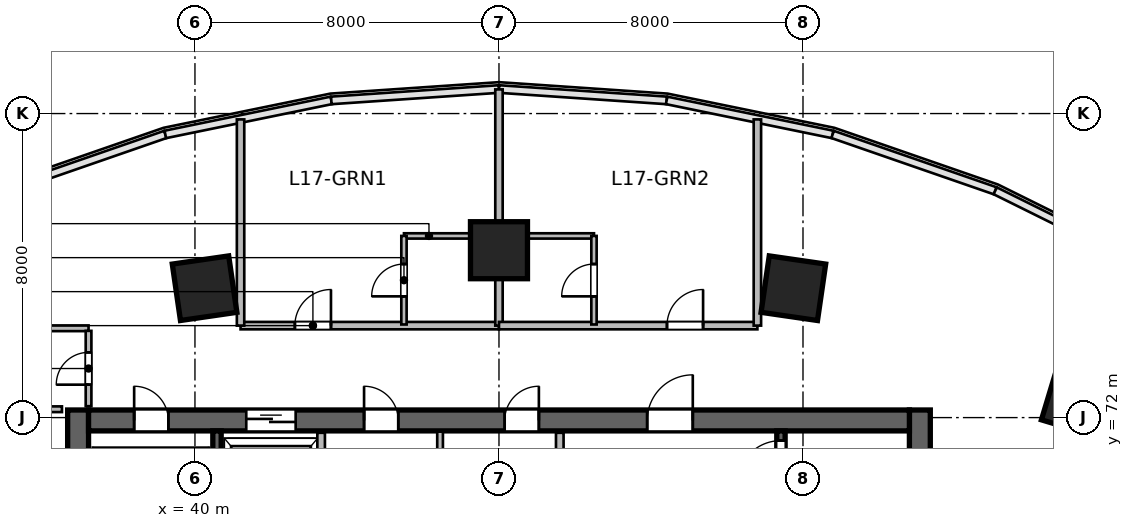
"""IFC4 building model, lengths in metres.
Left out: names, types, materials, properties, quantities, classifications, styles, units other than length and angle.
Written with IfcOpenShell. Run it as: python <this file> out.ifc"""

import sys

from ifc_helpers import new_model, si_unit, direction, frame, frame_2d, origin, origin_2d, place, context, subcontext, project, spatial, rectangle, extrude, source, transform, mapped, element, fill, save


model = new_model("IFC4")
c1 = context("Model", 3, precision=1e-05, world=origin(), true_north=direction((0.0, 1.0)))
c2 = subcontext(c1, "Body", "Model", "MODEL_VIEW")
j1 = project(units=[si_unit("LENGTHUNIT", "METRE"), si_unit("PLANEANGLEUNIT", "RADIAN")], contexts=[c1])
p1 = place(None, origin())
s1 = spatial("IfcSite", under=j1, at=p1, CompositionType="ELEMENT")
p2 = place(p1, origin())
s2 = spatial("IfcBuilding", under=s1, at=p2, CompositionType="ELEMENT")
p3 = place(p2, frame((0.0, 0.0, 75.0)))
s3 = spatial("IfcBuildingStorey", under=s2, at=p3, CompositionType="ELEMENT", Elevation=75.0)
m1 = source(origin(), c2, "Body", "SweptSolid", [
    extrude(rectangle(XDim=12.0, YDim=0.55, at=frame_2d((6.0, 0.0))), origin(), (0.0, 0.0, 1.0), 3.6),
])
for number, where, z_axis, x_axis in (
    (1, (36.925, 60.2, 0.0), (0.0, 0.0, 1.0), (0.0, 1.0, 0.0)),
    (2, (59.075, 60.2, 0.0), (0.0, 0.0, 1.0), (0.0, 1.0, 0.0)),
):
    element("IfcWall", number, at=place(p3, frame(where, z_axis=z_axis, x_axis=x_axis)), inside=s3, PredefinedType="SHEAR", context=c2, shape_type="MappedRepresentation", body=[
        mapped(m1, transform((0.0, 0.0, 0.0), scale=1.0)),
    ])
m2 = source(origin(), c2, "Body", "SweptSolid", [
    extrude(rectangle(XDim=21.6, YDim=0.55, at=frame_2d((10.8, 0.0))), origin(), (0.0, 0.0, 1.0), 3.6),
])
p4 = place(p3, frame((37.2, 71.925, 0.0), z_axis=(0.0, 0.0, 1.0), x_axis=(1.0, 0.0, 0.0)))
e3 = element("IfcWall", 3, at=p4, inside=s3, PredefinedType="SHEAR", context=c2, shape_type="MappedRepresentation", body=[
    mapped(m2, transform((0.0, 0.0, 0.0), scale=1.0)),
])
p5 = place(p4, frame((1.2, 0.0, 0.0)))
e4 = element("IfcOpeningElement", 4, at=p5, cuts=e3, PredefinedType="OPENING", context=c2, shape_type="SweptSolid", body=[
    extrude(rectangle(XDim=0.9, YDim=2.1, at=frame_2d((0.45, 1.05))), frame((0.0, 0.285, 0.0), z_axis=(0.0, -1.0, 0.0), x_axis=(1.0, 0.0, 0.0)), (0.0, 0.0, 1.0), 0.57),
])
p6 = place(p4, frame((14.7, 0.0, 0.0)))
e5 = element("IfcOpeningElement", 5, at=p6, cuts=e3, PredefinedType="OPENING", context=c2, shape_type="SweptSolid", body=[
    extrude(rectangle(XDim=1.2, YDim=2.15, at=frame_2d((0.6, 1.075))), frame((0.0, 0.285, 0.0), z_axis=(0.0, -1.0, 0.0), x_axis=(1.0, 0.0, 0.0)), (0.0, 0.0, 1.0), 0.57),
])
p7 = place(p4, frame((4.15, 0.0, 0.0)))
e6 = element("IfcOpeningElement", 6, at=p7, cuts=e3, PredefinedType="OPENING", context=c2, shape_type="SweptSolid", body=[
    extrude(rectangle(XDim=1.3, YDim=2.15, at=frame_2d((0.65, 1.075))), frame((0.0, 0.285, 0.0), z_axis=(0.0, -1.0, 0.0), x_axis=(1.0, 0.0, 0.0)), (0.0, 0.0, 1.0), 0.57),
])
p8 = place(p4, frame((7.25, 0.0, 0.0)))
e7 = element("IfcOpeningElement", 7, at=p8, cuts=e3, PredefinedType="OPENING", context=c2, shape_type="SweptSolid", body=[
    extrude(rectangle(XDim=0.9, YDim=2.1, at=frame_2d((0.45, 1.05))), frame((0.0, 0.285, 0.0), z_axis=(0.0, -1.0, 0.0), x_axis=(1.0, 0.0, 0.0)), (0.0, 0.0, 1.0), 0.57),
])
p9 = place(p4, frame((10.95, 0.0, 0.0)))
e8 = element("IfcOpeningElement", 8, at=p9, cuts=e3, PredefinedType="OPENING", context=c2, shape_type="SweptSolid", body=[
    extrude(rectangle(XDim=0.9, YDim=2.1, at=frame_2d((0.45, 1.05))), frame((0.0, 0.285, 0.0), z_axis=(0.0, -1.0, 0.0), x_axis=(1.0, 0.0, 0.0)), (0.0, 0.0, 1.0), 0.57),
])
m3 = source(origin(), c2, "Body", "SweptSolid", [
    extrude(rectangle(XDim=10.9, YDim=0.22, at=frame_2d((5.45, 0.0))), origin(), (0.0, 0.0, 1.0), 3.6),
])
p10 = place(p3, frame((40.58, 60.75, 0.0), z_axis=(0.0, 0.0, 1.0), x_axis=(0.0, 1.0, 0.0)))
e9 = element("IfcWall", 9, at=p10, inside=s3, PredefinedType="SHEAR", context=c2, shape_type="MappedRepresentation", body=[
    mapped(m3, transform((0.0, 0.0, 0.0), scale=1.0)),
])
p11 = place(p3, frame((55.42, 60.75, 0.0), z_axis=(0.0, 0.0, 1.0), x_axis=(0.0, 1.0, 0.0)))
e10 = element("IfcWall", 10, at=p11, inside=s3, PredefinedType="SHEAR", context=c2, shape_type="MappedRepresentation", body=[
    mapped(m3, transform((0.0, 0.0, 0.0), scale=1.0)),
])
p12 = place(p11, frame((9.495, 0.0, 0.0)))
e11 = element("IfcOpeningElement", 11, at=p12, cuts=e10, PredefinedType="OPENING", context=c2, shape_type="SweptSolid", body=[
    extrude(rectangle(XDim=1.15, YDim=2.15, at=frame_2d((0.575, 1.075))), frame((0.0, 0.12, 0.0), z_axis=(0.0, -1.0, 0.0), x_axis=(1.0, 0.0, 0.0)), (0.0, 0.0, 1.0), 0.24),
])
m4 = source(origin(), c2, "Body", "SweptSolid", [
    extrude(rectangle(XDim=1.5, YDim=1.5, at=origin_2d()), origin(), (0.0, 0.0, 1.0), 3.6),
])
for number, where, z_axis, x_axis in (
    (12, (40.253, 75.404, 0.0), (0.0, 0.0, 1.0), (-0.143, 0.99, 0.0)),
    (13, (48.0, 76.404, 0.0), (0.0, 0.0, 1.0), (0.0, 1.0, 0.0)),
    (14, (55.747, 75.404, 0.0), (0.0, 0.0, 1.0), (0.143, 0.99, 0.0)),
    (15, (63.209, 72.442, 0.0), (0.0, 0.0, 1.0), (0.289, 0.957, 0.0)),
):
    element("IfcColumn", number, at=place(p3, frame(where, z_axis=z_axis, x_axis=x_axis)), inside=s3, PredefinedType="COLUMN", context=c2, shape_type="MappedRepresentation", body=[
        mapped(m4, transform((0.0, 0.0, 0.0), scale=1.0)),
    ])
m5 = source(origin(), c2, "Body", "SweptSolid", [
    extrude(rectangle(XDim=5.8, YDim=0.2, at=frame_2d((2.9, 0.0))), origin(), (0.0, 0.0, 1.0), 3.36),
])
p13 = place(p3, frame((49.6, 65.8, 0.0), z_axis=(0.0, 0.0, 1.0), x_axis=(0.0, 1.0, 0.0)))
e16 = element("IfcWall", 16, at=p13, inside=s3, PredefinedType="SOLIDWALL", context=c2, shape_type="MappedRepresentation", body=[
    mapped(m5, transform((0.0, 0.0, 0.0), scale=1.0)),
])
m6 = source(origin(), c2, "Body", "SweptSolid", [
    extrude(rectangle(XDim=3.2, YDim=0.2, at=frame_2d((1.6, 0.0))), origin(), (0.0, 0.0, 1.0), 3.36),
])
p14 = place(p3, frame((43.32, 68.4, 0.0), z_axis=(0.0, 0.0, 1.0), x_axis=(0.0, 1.0, 0.0)))
e17 = element("IfcWall", 17, at=p14, inside=s3, PredefinedType="SOLIDWALL", context=c2, shape_type="MappedRepresentation", body=[
    mapped(m6, transform((0.0, 0.0, 0.0), scale=1.0)),
])
m7 = source(origin(), c2, "Body", "SweptSolid", [
    extrude(rectangle(XDim=3.23, YDim=0.15, at=frame_2d((1.615, 0.0))), origin(), (0.0, 0.0, 1.0), 3.36),
])
p15 = place(p3, frame((46.45, 68.4, 0.0), z_axis=(0.0, 0.0, 1.0), x_axis=(0.0, 1.0, 0.0)))
e18 = element("IfcWall", 18, at=p15, inside=s3, PredefinedType="PARTITIONING", context=c2, shape_type="MappedRepresentation", body=[
    mapped(m7, transform((0.0, 0.0, 0.0), scale=1.0)),
])
m8 = source(origin(), c2, "Body", "SweptSolid", [
    extrude(rectangle(XDim=2.1, YDim=0.15, at=frame_2d((1.05, 0.0))), origin(), (0.0, 0.0, 1.0), 3.36),
])
p16 = place(p3, frame((34.4, 72.22, 0.0), z_axis=(0.0, 0.0, 1.0), x_axis=(1.0, 0.0, 0.0)))
e19 = element("IfcWall", 19, at=p16, inside=s3, PredefinedType="PARTITIONING", context=c2, shape_type="MappedRepresentation", body=[
    mapped(m8, transform((0.0, 0.0, 0.0), scale=1.0)),
])
m9 = source(origin(), c2, "Body", "SweptSolid", [
    extrude(rectangle(XDim=2.8, YDim=0.15, at=frame_2d((1.4, 0.0))), origin(), (0.0, 0.0, 1.0), 3.36),
])
p17 = place(p3, frame((34.4, 74.35, 0.0), z_axis=(0.0, 0.0, 1.0), x_axis=(1.0, 0.0, 0.0)))
e20 = element("IfcWall", 20, at=p17, inside=s3, PredefinedType="PARTITIONING", context=c2, shape_type="MappedRepresentation", body=[
    mapped(m9, transform((0.0, 0.0, 0.0), scale=1.0)),
])
m10 = source(origin(), c2, "Body", "SweptSolid", [
    extrude(rectangle(XDim=1.982, YDim=0.15, at=frame_2d((0.991, 0.0))), origin(), (0.0, 0.0, 1.0), 3.36),
])
p18 = place(p3, frame((37.2, 72.3, 0.0), z_axis=(0.0, 0.0, 1.0), x_axis=(0.0, 1.0, 0.0)))
e21 = element("IfcWall", 21, at=p18, inside=s3, PredefinedType="PARTITIONING", context=c2, shape_type="MappedRepresentation", body=[
    mapped(m10, transform((0.0, 0.0, 0.0), scale=1.0)),
])
p19 = place(p18, frame((0.566, 0.0, 0.0)))
e22 = element("IfcOpeningElement", 22, at=p19, cuts=e21, PredefinedType="OPENING", context=c2, shape_type="SweptSolid", body=[
    extrude(rectangle(XDim=0.85, YDim=2.1, at=frame_2d((0.425, 1.05))), frame((0.0, 0.085, 0.0), z_axis=(0.0, -1.0, 0.0), x_axis=(1.0, 0.0, 0.0)), (0.0, 0.0, 1.0), 0.17),
])
m11 = source(origin(), c2, "Body", "SweptSolid", [
    extrude(rectangle(XDim=6.8, YDim=0.195, at=frame_2d((3.4, 0.0))), origin(), (0.0, 0.0, 1.0), 3.36),
])
p20 = place(p3, frame((41.2, 74.42, 0.0), z_axis=(0.0, 0.0, 1.0), x_axis=(1.0, 0.0, 0.0)))
e23 = element("IfcWall", 23, at=p20, inside=s3, PredefinedType="PARTITIONING", context=c2, shape_type="MappedRepresentation", body=[
    mapped(m11, transform((0.0, 0.0, 0.0), scale=1.0)),
])
p21 = place(p20, frame((1.429, 0.0, 0.0)))
e24 = element("IfcOpeningElement", 24, at=p21, cuts=e23, PredefinedType="OPENING", context=c2, shape_type="SweptSolid", body=[
    extrude(rectangle(XDim=0.95, YDim=2.15, at=frame_2d((0.475, 1.075))), frame((0.0, 0.107, 0.0), z_axis=(0.0, -1.0, 0.0), x_axis=(1.0, 0.0, 0.0)), (0.0, 0.0, 1.0), 0.215),
])
m12 = source(origin(), c2, "Body", "SweptSolid", [
    extrude(rectangle(XDim=6.216, YDim=0.195, at=frame_2d((3.108, 0.0))), origin(), (0.0, 0.0, 1.0), 2.644),
])
p22 = place(p3, frame((48.0, 74.42, 0.0), z_axis=(0.0, 0.0, 1.0), x_axis=(0.0, 1.0, 0.0)))
e25 = element("IfcWall", 25, at=p22, inside=s3, PredefinedType="PARTITIONING", context=c2, shape_type="MappedRepresentation", body=[
    mapped(m12, transform((0.0, 0.0, 0.0), scale=1.0)),
])
m13 = source(origin(), c2, "Body", "SweptSolid", [
    extrude(rectangle(XDim=5.426, YDim=0.195, at=frame_2d((2.713, 0.0))), origin(), (0.0, 0.0, 1.0), 3.36),
])
p23 = place(p3, frame((41.2, 74.42, 0.0), z_axis=(0.0, 0.0, 1.0), x_axis=(0.0, 1.0, 0.0)))
e26 = element("IfcWall", 26, at=p23, inside=s3, PredefinedType="PARTITIONING", context=c2, shape_type="MappedRepresentation", body=[
    mapped(m13, transform((0.0, 0.0, 0.0), scale=1.0)),
])
m14 = source(origin(), c2, "Body", "SweptSolid", [
    extrude(rectangle(XDim=2.35, YDim=0.14, at=frame_2d((1.175, 0.0))), origin(), (0.0, 0.0, 1.0), 3.36),
])
p24 = place(p3, frame((45.5, 76.78, 0.0), z_axis=(0.0, 0.0, 1.0), x_axis=(1.0, 0.0, 0.0)))
e27 = element("IfcWall", 27, at=p24, inside=s3, PredefinedType="PARTITIONING", context=c2, shape_type="MappedRepresentation", body=[
    mapped(m14, transform((0.0, 0.0, 0.0), scale=1.0)),
])
m15 = source(origin(), c2, "Body", "SweptSolid", [
    extrude(rectangle(XDim=2.33, YDim=0.14, at=frame_2d((1.165, 0.0))), origin(), (0.0, 0.0, 1.0), 3.36),
])
p25 = place(p3, frame((45.5, 74.45, 0.0), z_axis=(0.0, 0.0, 1.0), x_axis=(0.0, 1.0, 0.0)))
e28 = element("IfcWall", 28, at=p25, inside=s3, PredefinedType="PARTITIONING", context=c2, shape_type="MappedRepresentation", body=[
    mapped(m15, transform((0.0, 0.0, 0.0), scale=1.0)),
])
p26 = place(p25, frame((0.74, 0.0, 0.0)))
e29 = element("IfcOpeningElement", 29, at=p26, cuts=e28, PredefinedType="OPENING", context=c2, shape_type="SweptSolid", body=[
    extrude(rectangle(XDim=0.85, YDim=2.05, at=frame_2d((0.425, 1.025))), frame((0.0, 0.08, 0.0), z_axis=(0.0, -1.0, 0.0), x_axis=(1.0, 0.0, 0.0)), (0.0, 0.0, 1.0), 0.16),
])
p27 = place(p3, frame((48.0, 74.42, 0.0), z_axis=(0.0, 0.0, 1.0), x_axis=(1.0, 0.0, 0.0)))
e30 = element("IfcWall", 30, at=p27, inside=s3, PredefinedType="PARTITIONING", context=c2, shape_type="MappedRepresentation", body=[
    mapped(m11, transform((0.0, 0.0, 0.0), scale=1.0)),
])
p28 = place(p27, frame((4.421, 0.0, 0.0)))
e31 = element("IfcOpeningElement", 31, at=p28, cuts=e30, PredefinedType="OPENING", context=c2, shape_type="SweptSolid", body=[
    extrude(rectangle(XDim=0.95, YDim=2.15, at=frame_2d((0.475, 1.075))), frame((0.0, 0.107, 0.0), z_axis=(0.0, -1.0, 0.0), x_axis=(1.0, 0.0, 0.0)), (0.0, 0.0, 1.0), 0.215),
])
p29 = place(p3, frame((54.8, 74.42, 0.0), z_axis=(0.0, 0.0, 1.0), x_axis=(0.0, 1.0, 0.0)))
e32 = element("IfcWall", 32, at=p29, inside=s3, PredefinedType="PARTITIONING", context=c2, shape_type="MappedRepresentation", body=[
    mapped(m13, transform((0.0, 0.0, 0.0), scale=1.0)),
])
p30 = place(p3, frame((48.15, 76.78, 0.0), z_axis=(0.0, 0.0, 1.0), x_axis=(1.0, 0.0, 0.0)))
e33 = element("IfcWall", 33, at=p30, inside=s3, PredefinedType="PARTITIONING", context=c2, shape_type="MappedRepresentation", body=[
    mapped(m14, transform((0.0, 0.0, 0.0), scale=1.0)),
])
p31 = place(p3, frame((50.5, 74.45, 0.0), z_axis=(0.0, 0.0, 1.0), x_axis=(0.0, 1.0, 0.0)))
e34 = element("IfcWall", 34, at=p31, inside=s3, PredefinedType="PARTITIONING", context=c2, shape_type="MappedRepresentation", body=[
    mapped(m15, transform((0.0, 0.0, 0.0), scale=1.0)),
])
p32 = place(p31, frame((0.74, 0.0, 0.0)))
e35 = element("IfcOpeningElement", 35, at=p32, cuts=e34, PredefinedType="OPENING", context=c2, shape_type="SweptSolid", body=[
    extrude(rectangle(XDim=0.85, YDim=2.05, at=frame_2d((0.425, 1.025))), frame((0.0, 0.08, 0.0), z_axis=(0.0, -1.0, 0.0), x_axis=(1.0, 0.0, 0.0)), (0.0, 0.0, 1.0), 0.16),
])
m16 = source(origin(), c2, "Body", "SweptSolid", [
    extrude(rectangle(XDim=0.9, YDim=2.1, at=frame_2d((0.45, 1.05))), frame((0.0, 0.025, 0.0), z_axis=(0.0, -1.0, 0.0), x_axis=(1.0, 0.0, 0.0)), (0.0, 0.0, 1.0), 0.05),
])
p33 = place(p5, origin())
e36 = element("IfcDoor", 36, at=p33, inside=s3, OperationType="SINGLE_SWING_LEFT", PredefinedType="DOOR", context=c2, shape_type="MappedRepresentation", body=[
    mapped(m16, transform((0.0, 0.0, 0.0), scale=1.0)),
])
fill(e4, e36)
m17 = source(origin(), c2, "Body", "SweptSolid", [
    extrude(rectangle(XDim=1.15, YDim=2.15, at=frame_2d((0.575, 1.075))), frame((0.0, 0.025, 0.0), z_axis=(0.0, -1.0, 0.0), x_axis=(1.0, 0.0, 0.0)), (0.0, 0.0, 1.0), 0.05),
])
p34 = place(p12, origin())
e37 = element("IfcDoor", 37, at=p34, inside=s3, OperationType="SINGLE_SWING_LEFT", PredefinedType="DOOR", context=c2, shape_type="MappedRepresentation", body=[
    mapped(m17, transform((0.0, 0.0, 0.0), scale=1.0)),
])
fill(e11, e37)
m18 = source(origin(), c2, "Body", "SweptSolid", [
    extrude(rectangle(XDim=1.2, YDim=2.15, at=frame_2d((0.6, 1.075))), frame((0.0, 0.025, 0.0), z_axis=(0.0, -1.0, 0.0), x_axis=(1.0, 0.0, 0.0)), (0.0, 0.0, 1.0), 0.05),
])
p35 = place(p6, origin())
e38 = element("IfcDoor", 38, at=p35, inside=s3, OperationType="SINGLE_SWING_RIGHT", PredefinedType="DOOR", context=c2, shape_type="MappedRepresentation", body=[
    mapped(m18, transform((0.0, 0.0, 0.0), scale=1.0)),
])
fill(e5, e38)
m19 = source(origin(), c2, "Body", "SweptSolid", [
    extrude(rectangle(XDim=1.3, YDim=2.15, at=frame_2d((0.65, 1.075))), frame((0.0, 0.025, 0.0), z_axis=(0.0, -1.0, 0.0), x_axis=(1.0, 0.0, 0.0)), (0.0, 0.0, 1.0), 0.05),
])
p36 = place(p7, origin())
e39 = element("IfcDoor", 39, at=p36, inside=s3, OperationType="DOUBLE_DOOR_SLIDING", PredefinedType="DOOR", context=c2, shape_type="MappedRepresentation", body=[
    mapped(m19, transform((0.0, 0.0, 0.0), scale=1.0)),
])
fill(e6, e39)
p37 = place(p8, origin())
e40 = element("IfcDoor", 40, at=p37, inside=s3, OperationType="SINGLE_SWING_LEFT", PredefinedType="DOOR", context=c2, shape_type="MappedRepresentation", body=[
    mapped(m16, transform((0.0, 0.0, 0.0), scale=1.0)),
])
fill(e7, e40)
p38 = place(p9, origin())
e41 = element("IfcDoor", 41, at=p38, inside=s3, OperationType="SINGLE_SWING_RIGHT", PredefinedType="DOOR", context=c2, shape_type="MappedRepresentation", body=[
    mapped(m16, transform((0.0, 0.0, 0.0), scale=1.0)),
])
fill(e8, e41)
m20 = source(origin(), c2, "Body", "SweptSolid", [
    extrude(rectangle(XDim=0.85, YDim=2.1, at=frame_2d((0.425, 1.05))), frame((0.0, 0.025, 0.0), z_axis=(0.0, -1.0, 0.0), x_axis=(1.0, 0.0, 0.0)), (0.0, 0.0, 1.0), 0.05),
])
p39 = place(p19, origin())
e42 = element("IfcDoor", 42, at=p39, inside=s3, OperationType="SINGLE_SWING_LEFT", PredefinedType="DOOR", context=c2, shape_type="MappedRepresentation", body=[
    mapped(m20, transform((0.0, 0.0, 0.0), scale=1.0)),
])
fill(e22, e42)
m21 = source(origin(), c2, "Body", "SweptSolid", [
    extrude(rectangle(XDim=0.95, YDim=2.15, at=frame_2d((0.475, 1.075))), frame((0.0, 0.025, 0.0), z_axis=(0.0, -1.0, 0.0), x_axis=(1.0, 0.0, 0.0)), (0.0, 0.0, 1.0), 0.05),
])
p40 = place(p21, origin())
e43 = element("IfcDoor", 43, at=p40, inside=s3, OperationType="SINGLE_SWING_RIGHT", PredefinedType="DOOR", context=c2, shape_type="MappedRepresentation", body=[
    mapped(m21, transform((0.0, 0.0, 0.0), scale=1.0)),
])
fill(e24, e43)
m22 = source(origin(), c2, "Body", "SweptSolid", [
    extrude(rectangle(XDim=0.85, YDim=2.05, at=frame_2d((0.425, 1.025))), frame((0.0, 0.025, 0.0), z_axis=(0.0, -1.0, 0.0), x_axis=(1.0, 0.0, 0.0)), (0.0, 0.0, 1.0), 0.05),
])
p41 = place(p26, origin())
e44 = element("IfcDoor", 44, at=p41, inside=s3, OperationType="SINGLE_SWING_LEFT", PredefinedType="DOOR", context=c2, shape_type="MappedRepresentation", body=[
    mapped(m22, transform((0.0, 0.0, 0.0), scale=1.0)),
])
fill(e29, e44)
p42 = place(p28, origin())
e45 = element("IfcDoor", 45, at=p42, inside=s3, OperationType="SINGLE_SWING_RIGHT", PredefinedType="DOOR", context=c2, shape_type="MappedRepresentation", body=[
    mapped(m21, transform((0.0, 0.0, 0.0), scale=1.0)),
])
fill(e31, e45)
p43 = place(p32, origin())
e46 = element("IfcDoor", 46, at=p43, inside=s3, OperationType="SINGLE_SWING_LEFT", PredefinedType="DOOR", context=c2, shape_type="MappedRepresentation", body=[
    mapped(m22, transform((0.0, 0.0, 0.0), scale=1.0)),
])
fill(e35, e46)
save(model, sys.argv[1])
